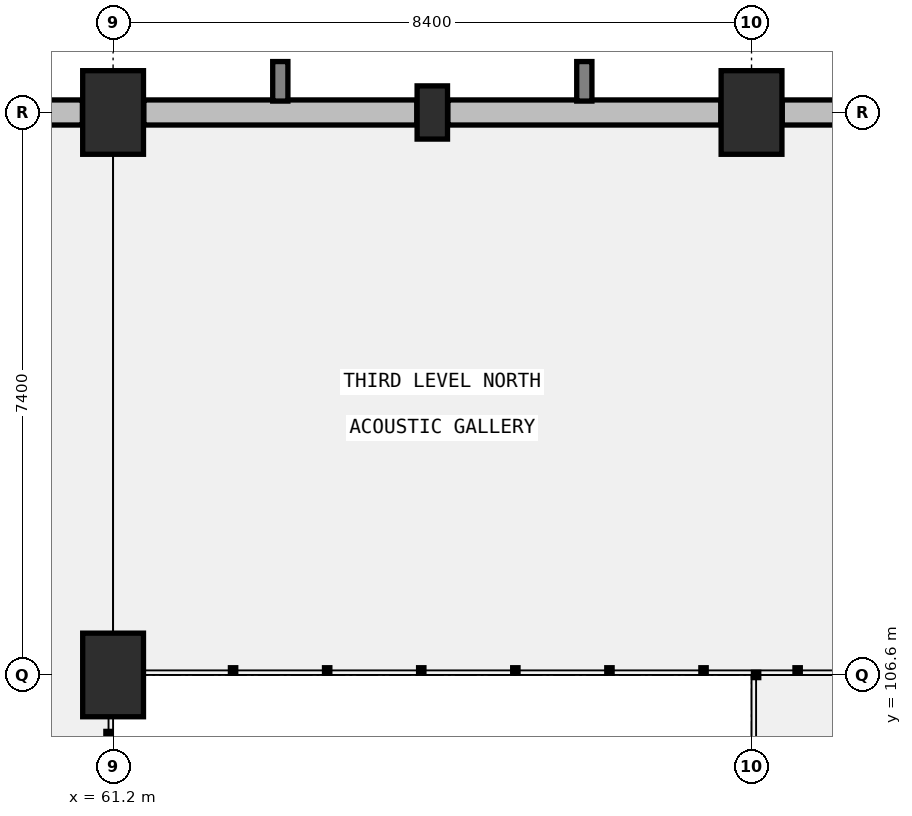
"""IFC4 building model, lengths in metres.
Left out: names, types, materials, properties, quantities, classifications, styles, units other than length and angle.
Written with IfcOpenShell. Run it as: python <this file> out.ifc"""

import sys

from ifc_helpers import new_model, si_unit, direction, frame, frame_2d, origin, origin_2d, place, context, subcontext, project, spatial, rectangle, extrude, element, save


model = new_model("IFC4")
c1 = context("Model", 3, precision=1e-05, world=origin(), true_north=direction((0.0, 1.0)))
c2 = subcontext(c1, "Body", "Model", "MODEL_VIEW")
j1 = project(units=[si_unit("LENGTHUNIT", "METRE"), si_unit("PLANEANGLEUNIT", "RADIAN")], contexts=[c1])
p1 = place(None, origin())
s1 = spatial("IfcSite", under=j1, at=p1, CompositionType="ELEMENT")
p2 = place(p1, origin())
s2 = spatial("IfcBuilding", under=s1, at=p2, CompositionType="ELEMENT")
p3 = place(p2, frame((0.0, 0.0, 14.6)))
s3 = spatial("IfcBuildingStorey", under=s2, at=p3, CompositionType="ELEMENT", Elevation=14.6)
p4 = place(p3, frame((61.2, 106.6, 0.0), z_axis=(0.0, 0.0, 1.0), x_axis=(1.0, 0.0, 0.0)))
e1 = element("IfcColumn", 1, at=p4, inside=s3, PredefinedType="COLUMN", context=c2, shape_type="SweptSolid", body=[
    extrude(rectangle(XDim=0.8, YDim=1.1, at=origin_2d()), origin(), (0.0, 0.0, 1.0), 4.6),
])
p5 = place(p3, frame((61.2, 114.0, 0.0), z_axis=(0.0, 0.0, 1.0), x_axis=(1.0, 0.0, 0.0)))
e2 = element("IfcColumn", 2, at=p5, inside=s3, PredefinedType="COLUMN", context=c2, shape_type="SweptSolid", body=[
    extrude(rectangle(XDim=0.8, YDim=1.1, at=origin_2d()), origin(), (0.0, 0.0, 1.0), 3.02),
])
p6 = place(p3, frame((65.4, 114.0, 0.0), z_axis=(0.0, 0.0, 1.0), x_axis=(1.0, 0.0, 0.0)))
e3 = element("IfcColumn", 3, at=p6, inside=s3, PredefinedType="PILASTER", context=c2, shape_type="SweptSolid", body=[
    extrude(rectangle(XDim=0.4, YDim=0.7, at=origin_2d()), origin(), (0.0, 0.0, 1.0), 3.02),
])
p7 = place(p3, frame((69.6, 114.0, 0.0), z_axis=(0.0, 0.0, 1.0), x_axis=(1.0, 0.0, 0.0)))
e4 = element("IfcColumn", 4, at=p7, inside=s3, PredefinedType="COLUMN", context=c2, shape_type="SweptSolid", body=[
    extrude(rectangle(XDim=0.8, YDim=1.1, at=origin_2d()), origin(), (0.0, 0.0, 1.0), 3.02),
])
p8 = place(p3, frame((57.204, 114.0, 0.0), z_axis=(0.0, 0.0, 1.0), x_axis=(1.0, 0.0, 0.0)))
e5 = element("IfcWall", 5, at=p8, inside=s3, PredefinedType="STANDARD", context=c2, shape_type="SweptSolid", body=[
    extrude(rectangle(XDim=3.592, YDim=0.33, at=frame_2d((1.796, 0.0))), origin(), (0.0, 0.0, 1.0), 2.848),
])
for number, where, z_axis, x_axis in (
    (6, (61.604, 114.0, 0.0), (0.0, 0.0, 1.0), (1.0, 0.0, 0.0)),
    (7, (65.604, 114.0, 0.0), (0.0, 0.0, 1.0), (1.0, 0.0, 0.0)),
    (8, (70.004, 114.0, 0.0), (0.0, 0.0, 1.0), (1.0, 0.0, 0.0)),
):
    element("IfcWall", number, at=place(p3, frame(where, z_axis=z_axis, x_axis=x_axis)), inside=s3, PredefinedType="STANDARD", context=c2, shape_type="SweptSolid", body=[
        extrude(rectangle(XDim=3.592, YDim=0.33, at=frame_2d((1.796, 0.0))), origin(), (0.0, 0.0, 1.0), 2.848),
    ])
save(model, sys.argv[1])
